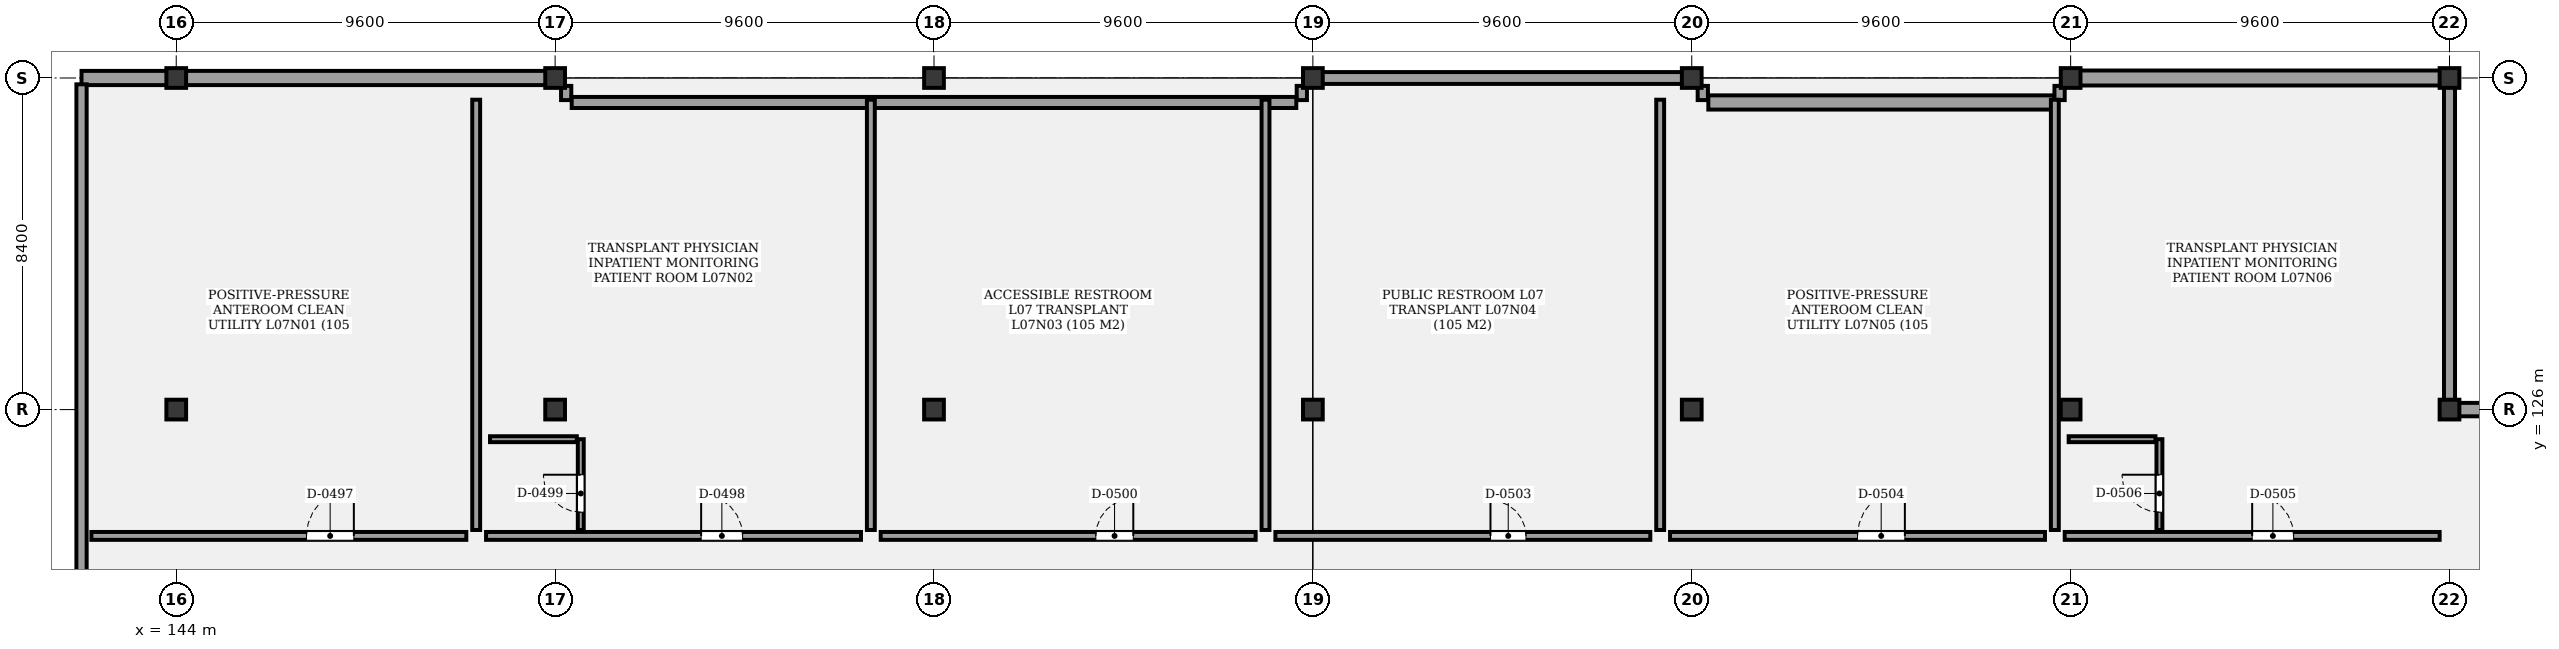
"""IFC4 building model, lengths in metres.
Left out: names, types, materials, properties, quantities, classifications, styles, units other than length and angle.
Written with IfcOpenShell. Run it as: python <this file> out.ifc"""

import sys

from ifc_helpers import new_model, si_unit, direction, frame, frame_2d, origin, origin_2d, place, context, subcontext, project, spatial, rectangle, extrude, element, fill, save


model = new_model("IFC4")
c1 = context("Model", 3, precision=1e-05, world=origin(), true_north=direction((0.0, 1.0)))
c2 = subcontext(c1, "Body", "Model", "MODEL_VIEW")
j1 = project(units=[si_unit("LENGTHUNIT", "METRE"), si_unit("PLANEANGLEUNIT", "RADIAN")], contexts=[c1])
p1 = place(None, origin())
s1 = spatial("IfcSite", under=j1, at=p1, CompositionType="ELEMENT")
p2 = place(p1, origin())
s2 = spatial("IfcBuilding", under=s1, at=p2, CompositionType="ELEMENT")
p3 = place(p2, frame((0.0, 0.0, 30.4)))
s3 = spatial("IfcBuildingStorey", under=s2, at=p3, CompositionType="ELEMENT", Elevation=30.4)
for number, where, z_axis, x_axis in (
    (1, (144.0, 126.0, 0.0), (0.0, 0.0, 1.0), (1.0, 0.0, 0.0)),
    (2, (144.0, 134.4, 0.0), (0.0, 0.0, 1.0), (1.0, 0.0, 0.0)),
    (3, (153.6, 126.0, 0.0), (0.0, 0.0, 1.0), (1.0, 0.0, 0.0)),
    (4, (153.6, 134.4, 0.0), (0.0, 0.0, 1.0), (1.0, 0.0, 0.0)),
    (5, (163.2, 126.0, 0.0), (0.0, 0.0, 1.0), (1.0, 0.0, 0.0)),
    (6, (163.2, 134.4, 0.0), (0.0, 0.0, 1.0), (1.0, 0.0, 0.0)),
    (7, (172.8, 126.0, 0.0), (0.0, 0.0, 1.0), (1.0, 0.0, 0.0)),
    (8, (172.8, 134.4, 0.0), (0.0, 0.0, 1.0), (1.0, 0.0, 0.0)),
    (9, (182.4, 126.0, 0.0), (0.0, 0.0, 1.0), (1.0, 0.0, 0.0)),
    (10, (182.4, 134.4, 0.0), (0.0, 0.0, 1.0), (1.0, 0.0, 0.0)),
    (11, (192.0, 126.0, 0.0), (0.0, 0.0, 1.0), (1.0, 0.0, 0.0)),
    (12, (192.0, 134.4, 0.0), (0.0, 0.0, 1.0), (1.0, 0.0, 0.0)),
    (13, (201.6, 126.0, 0.0), (0.0, 0.0, 1.0), (1.0, 0.0, 0.0)),
    (14, (201.6, 134.4, 0.0), (0.0, 0.0, 1.0), (1.0, 0.0, 0.0)),
):
    element("IfcColumn", number, at=place(p3, frame(where, z_axis=z_axis, x_axis=x_axis)), inside=s3, PredefinedType="COLUMN", context=c2, shape_type="SweptSolid", body=[
        extrude(rectangle(XDim=0.5, YDim=0.5, at=origin_2d()), origin(), (0.0, 0.0, 1.0), 4.2),
    ])
p4 = place(p3, frame((201.6, 126.0, 0.0), z_axis=(0.0, 0.0, 1.0), x_axis=(1.0, 0.0, 0.0)))
e15 = element("IfcWall", 15, at=p4, inside=s3, PredefinedType="SOLIDWALL", context=c2, shape_type="SweptSolid", body=[
    extrude(rectangle(XDim=9.6, YDim=0.34, at=frame_2d((4.8, 0.0))), origin(), (0.0, 0.0, 1.0), 2.58),
])
p5 = place(p3, frame((141.6, 134.4, 0.0), z_axis=(0.0, 0.0, 1.0), x_axis=(1.0, 0.0, 0.0)))
e16 = element("IfcWall", 16, at=p5, inside=s3, PredefinedType="SOLIDWALL", context=c2, shape_type="SweptSolid", body=[
    extrude(rectangle(XDim=12.0, YDim=0.36, at=frame_2d((6.0, 0.0))), origin(), (0.0, 0.0, 1.0), 2.58),
])
for number, where, z_axis, x_axis in (
    (17, (153.88, 134.2, 0.0), (0.0, 0.0, 1.0), (0.0, -1.0, 0.0)),
    (18, (172.52, 134.2, 0.0), (0.0, 0.0, 1.0), (0.0, -1.0, 0.0)),
):
    element("IfcWall", number, at=place(p3, frame(where, z_axis=z_axis, x_axis=x_axis)), inside=s3, PredefinedType="SOLIDWALL", context=c2, shape_type="SweptSolid", body=[
        extrude(rectangle(XDim=0.36, YDim=0.26, at=frame_2d((0.18, 0.0))), origin(), (0.0, 0.0, 1.0), 2.58),
    ])
p6 = place(p3, frame((154.02, 133.78, 0.0), z_axis=(0.0, 0.0, 1.0), x_axis=(1.0, 0.0, 0.0)))
e19 = element("IfcWall", 19, at=p6, inside=s3, PredefinedType="SOLIDWALL", context=c2, shape_type="SweptSolid", body=[
    extrude(rectangle(XDim=18.36, YDim=0.28, at=frame_2d((9.18, 0.0))), origin(), (0.0, 0.0, 1.0), 2.58),
])
p7 = place(p3, frame((172.8, 134.4, 0.0), z_axis=(0.0, 0.0, 1.0), x_axis=(1.0, 0.0, 0.0)))
e20 = element("IfcWall", 20, at=p7, inside=s3, PredefinedType="SOLIDWALL", context=c2, shape_type="SweptSolid", body=[
    extrude(rectangle(XDim=9.6, YDim=0.3, at=frame_2d((4.8, 0.0))), origin(), (0.0, 0.0, 1.0), 2.58),
])
for number, where, z_axis, x_axis in (
    (21, (182.68, 134.2, 0.0), (0.0, 0.0, 1.0), (0.0, -1.0, 0.0)),
    (22, (191.72, 134.2, 0.0), (0.0, 0.0, 1.0), (0.0, -1.0, 0.0)),
):
    element("IfcWall", number, at=place(p3, frame(where, z_axis=z_axis, x_axis=x_axis)), inside=s3, PredefinedType="SOLIDWALL", context=c2, shape_type="SweptSolid", body=[
        extrude(rectangle(XDim=0.36, YDim=0.26, at=frame_2d((0.18, 0.0))), origin(), (0.0, 0.0, 1.0), 2.58),
    ])
p8 = place(p3, frame((182.82, 133.78, 0.0), z_axis=(0.0, 0.0, 1.0), x_axis=(1.0, 0.0, 0.0)))
e23 = element("IfcWall", 23, at=p8, inside=s3, PredefinedType="SOLIDWALL", context=c2, shape_type="SweptSolid", body=[
    extrude(rectangle(XDim=8.76, YDim=0.36, at=frame_2d((4.38, 0.0))), origin(), (0.0, 0.0, 1.0), 2.58),
])
p9 = place(p3, frame((192.0, 134.4, 0.0), z_axis=(0.0, 0.0, 1.0), x_axis=(1.0, 0.0, 0.0)))
e24 = element("IfcWall", 24, at=p9, inside=s3, PredefinedType="SOLIDWALL", context=c2, shape_type="SweptSolid", body=[
    extrude(rectangle(XDim=9.6, YDim=0.38, at=frame_2d((4.8, 0.0))), origin(), (0.0, 0.0, 1.0), 2.58),
])
p10 = place(p3, frame((141.6, 108.16, 0.0), z_axis=(0.0, 0.0, 1.0), x_axis=(0.0, 1.0, 0.0)))
e25 = element("IfcWall", 25, at=p10, inside=s3, PredefinedType="SOLIDWALL", context=c2, shape_type="SweptSolid", body=[
    extrude(rectangle(XDim=26.08, YDim=0.26, at=frame_2d((13.04, 0.0))), origin(), (0.0, 0.0, 1.0), 2.58),
])
p11 = place(p3, frame((201.6, 134.24, 0.0), z_axis=(0.0, 0.0, 1.0), x_axis=(0.0, -1.0, 0.0)))
e26 = element("IfcWall", 26, at=p11, inside=s3, PredefinedType="SOLIDWALL", context=c2, shape_type="SweptSolid", body=[
    extrude(rectangle(XDim=8.08, YDim=0.28, at=frame_2d((4.04, 0.0))), origin(), (0.0, 0.0, 1.0), 2.58),
])
p12 = place(p3, frame((141.85, 122.8, 0.0), z_axis=(0.0, 0.0, 1.0), x_axis=(1.0, 0.0, 0.0)))
e27 = element("IfcWall", 27, at=p12, inside=s3, PredefinedType="PARTITIONING", context=c2, shape_type="SweptSolid", body=[
    extrude(rectangle(XDim=9.5, YDim=0.2, at=frame_2d((4.75, 0.0))), origin(), (0.0, 0.0, 1.0), 2.58),
])
p13 = place(p12, frame((5.45, 0.0, 0.0)))
e28 = element("IfcOpeningElement", 28, at=p13, cuts=e27, PredefinedType="OPENING", context=c2, shape_type="SweptSolid", body=[
    extrude(rectangle(XDim=1.2, YDim=2.4, at=frame_2d((0.6, 1.2))), frame((0.0, 0.11, 0.0), z_axis=(0.0, -1.0, 0.0), x_axis=(1.0, 0.0, 0.0)), (0.0, 0.0, 1.0), 0.22),
])
p14 = place(p3, frame((151.85, 122.8, 0.0), z_axis=(0.0, 0.0, 1.0), x_axis=(1.0, 0.0, 0.0)))
e29 = element("IfcWall", 29, at=p14, inside=s3, PredefinedType="PARTITIONING", context=c2, shape_type="SweptSolid", body=[
    extrude(rectangle(XDim=9.5, YDim=0.2, at=frame_2d((4.75, 0.0))), origin(), (0.0, 0.0, 1.0), 2.58),
])
p15 = place(p14, frame((5.45, 0.0, 0.0)))
e30 = element("IfcOpeningElement", 30, at=p15, cuts=e29, PredefinedType="OPENING", context=c2, shape_type="SweptSolid", body=[
    extrude(rectangle(XDim=1.05, YDim=2.2, at=frame_2d((0.525, 1.1))), frame((0.0, 0.11, 0.0), z_axis=(0.0, -1.0, 0.0), x_axis=(1.0, 0.0, 0.0)), (0.0, 0.0, 1.0), 0.22),
])
p16 = place(p3, frame((154.25, 122.95, 0.0), z_axis=(0.0, 0.0, 1.0), x_axis=(0.0, 1.0, 0.0)))
e31 = element("IfcWall", 31, at=p16, inside=s3, PredefinedType="PARTITIONING", context=c2, shape_type="SweptSolid", body=[
    extrude(rectangle(XDim=2.3, YDim=0.15, at=frame_2d((1.15, 0.0))), origin(), (0.0, 0.0, 1.0), 2.58),
])
p17 = place(p16, frame((0.45, 0.0, 0.0)))
e32 = element("IfcOpeningElement", 32, at=p17, cuts=e31, PredefinedType="OPENING", context=c2, shape_type="SweptSolid", body=[
    extrude(rectangle(XDim=0.95, YDim=2.1, at=frame_2d((0.475, 1.05))), frame((0.0, 0.085, 0.0), z_axis=(0.0, -1.0, 0.0), x_axis=(1.0, 0.0, 0.0)), (0.0, 0.0, 1.0), 0.17),
])
p18 = place(p3, frame((151.95, 125.25, 0.0), z_axis=(0.0, 0.0, 1.0), x_axis=(1.0, 0.0, 0.0)))
e33 = element("IfcWall", 33, at=p18, inside=s3, PredefinedType="PARTITIONING", context=c2, shape_type="SweptSolid", body=[
    extrude(rectangle(XDim=2.2, YDim=0.15, at=frame_2d((1.1, 0.0))), origin(), (0.0, 0.0, 1.0), 2.58),
])
p19 = place(p3, frame((151.6, 122.95, 0.0), z_axis=(0.0, 0.0, 1.0), x_axis=(0.0, 1.0, 0.0)))
e34 = element("IfcWall", 34, at=p19, inside=s3, PredefinedType="PARTITIONING", context=c2, shape_type="SweptSolid", body=[
    extrude(rectangle(XDim=10.9, YDim=0.2, at=frame_2d((5.45, 0.0))), origin(), (0.0, 0.0, 1.0), 2.58),
])
p20 = place(p3, frame((161.85, 122.8, 0.0), z_axis=(0.0, 0.0, 1.0), x_axis=(1.0, 0.0, 0.0)))
e35 = element("IfcWall", 35, at=p20, inside=s3, PredefinedType="PARTITIONING", context=c2, shape_type="SweptSolid", body=[
    extrude(rectangle(XDim=9.5, YDim=0.2, at=frame_2d((4.75, 0.0))), origin(), (0.0, 0.0, 1.0), 2.58),
])
p21 = place(p20, frame((5.45, 0.0, 0.0)))
e36 = element("IfcOpeningElement", 36, at=p21, cuts=e35, PredefinedType="OPENING", context=c2, shape_type="SweptSolid", body=[
    extrude(rectangle(XDim=0.95, YDim=2.1, at=frame_2d((0.475, 1.05))), frame((0.0, 0.11, 0.0), z_axis=(0.0, -1.0, 0.0), x_axis=(1.0, 0.0, 0.0)), (0.0, 0.0, 1.0), 0.22),
])
p22 = place(p3, frame((161.6, 122.95, 0.0), z_axis=(0.0, 0.0, 1.0), x_axis=(0.0, 1.0, 0.0)))
e37 = element("IfcWall", 37, at=p22, inside=s3, PredefinedType="PARTITIONING", context=c2, shape_type="SweptSolid", body=[
    extrude(rectangle(XDim=10.9, YDim=0.2, at=frame_2d((5.45, 0.0))), origin(), (0.0, 0.0, 1.0), 2.58),
])
p23 = place(p3, frame((171.85, 122.8, 0.0), z_axis=(0.0, 0.0, 1.0), x_axis=(1.0, 0.0, 0.0)))
e38 = element("IfcWall", 38, at=p23, inside=s3, PredefinedType="PARTITIONING", context=c2, shape_type="SweptSolid", body=[
    extrude(rectangle(XDim=9.5, YDim=0.2, at=frame_2d((4.75, 0.0))), origin(), (0.0, 0.0, 1.0), 2.58),
])
p24 = place(p23, frame((5.45, 0.0, 0.0)))
e39 = element("IfcOpeningElement", 39, at=p24, cuts=e38, PredefinedType="OPENING", context=c2, shape_type="SweptSolid", body=[
    extrude(rectangle(XDim=0.9, YDim=2.1, at=frame_2d((0.45, 1.05))), frame((0.0, 0.11, 0.0), z_axis=(0.0, -1.0, 0.0), x_axis=(1.0, 0.0, 0.0)), (0.0, 0.0, 1.0), 0.22),
])
p25 = place(p3, frame((171.6, 122.95, 0.0), z_axis=(0.0, 0.0, 1.0), x_axis=(0.0, 1.0, 0.0)))
e40 = element("IfcWall", 40, at=p25, inside=s3, PredefinedType="PARTITIONING", context=c2, shape_type="SweptSolid", body=[
    extrude(rectangle(XDim=10.9, YDim=0.2, at=frame_2d((5.45, 0.0))), origin(), (0.0, 0.0, 1.0), 2.58),
])
p26 = place(p3, frame((181.85, 122.8, 0.0), z_axis=(0.0, 0.0, 1.0), x_axis=(1.0, 0.0, 0.0)))
e41 = element("IfcWall", 41, at=p26, inside=s3, PredefinedType="PARTITIONING", context=c2, shape_type="SweptSolid", body=[
    extrude(rectangle(XDim=9.5, YDim=0.2, at=frame_2d((4.75, 0.0))), origin(), (0.0, 0.0, 1.0), 2.58),
])
p27 = place(p26, frame((4.75, 0.0, 0.0)))
e42 = element("IfcOpeningElement", 42, at=p27, cuts=e41, PredefinedType="OPENING", context=c2, shape_type="SweptSolid", body=[
    extrude(rectangle(XDim=1.2, YDim=2.4, at=frame_2d((0.6, 1.2))), frame((0.0, 0.11, 0.0), z_axis=(0.0, -1.0, 0.0), x_axis=(1.0, 0.0, 0.0)), (0.0, 0.0, 1.0), 0.22),
])
p28 = place(p3, frame((181.6, 122.95, 0.0), z_axis=(0.0, 0.0, 1.0), x_axis=(0.0, 1.0, 0.0)))
e43 = element("IfcWall", 43, at=p28, inside=s3, PredefinedType="PARTITIONING", context=c2, shape_type="SweptSolid", body=[
    extrude(rectangle(XDim=10.9, YDim=0.2, at=frame_2d((5.45, 0.0))), origin(), (0.0, 0.0, 1.0), 2.58),
])
p29 = place(p3, frame((191.85, 122.8, 0.0), z_axis=(0.0, 0.0, 1.0), x_axis=(1.0, 0.0, 0.0)))
e44 = element("IfcWall", 44, at=p29, inside=s3, PredefinedType="PARTITIONING", context=c2, shape_type="SweptSolid", body=[
    extrude(rectangle(XDim=9.5, YDim=0.2, at=frame_2d((4.75, 0.0))), origin(), (0.0, 0.0, 1.0), 2.58),
])
p30 = place(p29, frame((4.75, 0.0, 0.0)))
e45 = element("IfcOpeningElement", 45, at=p30, cuts=e44, PredefinedType="OPENING", context=c2, shape_type="SweptSolid", body=[
    extrude(rectangle(XDim=1.05, YDim=2.2, at=frame_2d((0.525, 1.1))), frame((0.0, 0.11, 0.0), z_axis=(0.0, -1.0, 0.0), x_axis=(1.0, 0.0, 0.0)), (0.0, 0.0, 1.0), 0.22),
])
p31 = place(p3, frame((194.25, 122.95, 0.0), z_axis=(0.0, 0.0, 1.0), x_axis=(0.0, 1.0, 0.0)))
e46 = element("IfcWall", 46, at=p31, inside=s3, PredefinedType="PARTITIONING", context=c2, shape_type="SweptSolid", body=[
    extrude(rectangle(XDim=2.3, YDim=0.15, at=frame_2d((1.15, 0.0))), origin(), (0.0, 0.0, 1.0), 2.58),
])
p32 = place(p31, frame((0.45, 0.0, 0.0)))
e47 = element("IfcOpeningElement", 47, at=p32, cuts=e46, PredefinedType="OPENING", context=c2, shape_type="SweptSolid", body=[
    extrude(rectangle(XDim=0.95, YDim=2.1, at=frame_2d((0.475, 1.05))), frame((0.0, 0.085, 0.0), z_axis=(0.0, -1.0, 0.0), x_axis=(1.0, 0.0, 0.0)), (0.0, 0.0, 1.0), 0.17),
])
p33 = place(p3, frame((191.95, 125.25, 0.0), z_axis=(0.0, 0.0, 1.0), x_axis=(1.0, 0.0, 0.0)))
e48 = element("IfcWall", 48, at=p33, inside=s3, PredefinedType="PARTITIONING", context=c2, shape_type="SweptSolid", body=[
    extrude(rectangle(XDim=2.2, YDim=0.15, at=frame_2d((1.1, 0.0))), origin(), (0.0, 0.0, 1.0), 2.58),
])
p34 = place(p3, frame((191.6, 122.95, 0.0), z_axis=(0.0, 0.0, 1.0), x_axis=(0.0, 1.0, 0.0)))
e49 = element("IfcWall", 49, at=p34, inside=s3, PredefinedType="PARTITIONING", context=c2, shape_type="SweptSolid", body=[
    extrude(rectangle(XDim=10.9, YDim=0.2, at=frame_2d((5.45, 0.0))), origin(), (0.0, 0.0, 1.0), 2.58),
])
p35 = place(p13, origin())
e50 = element("IfcDoor", 50, at=p35, inside=s3, OperationType="SINGLE_SWING_RIGHT", PredefinedType="DOOR", context=c2, shape_type="SweptSolid", body=[
    extrude(rectangle(XDim=1.2, YDim=2.4, at=frame_2d((0.6, 1.2))), frame((0.0, 0.025, 0.0), z_axis=(0.0, -1.0, 0.0), x_axis=(1.0, 0.0, 0.0)), (0.0, 0.0, 1.0), 0.05),
])
fill(e28, e50)
p36 = place(p15, origin())
e51 = element("IfcDoor", 51, at=p36, inside=s3, OperationType="SINGLE_SWING_LEFT", PredefinedType="DOOR", context=c2, shape_type="SweptSolid", body=[
    extrude(rectangle(XDim=1.05, YDim=2.2, at=frame_2d((0.525, 1.1))), frame((0.0, 0.025, 0.0), z_axis=(0.0, -1.0, 0.0), x_axis=(1.0, 0.0, 0.0)), (0.0, 0.0, 1.0), 0.05),
])
fill(e30, e51)
p37 = place(p17, origin())
e52 = element("IfcDoor", 52, at=p37, inside=s3, OperationType="SINGLE_SWING_RIGHT", PredefinedType="DOOR", context=c2, shape_type="SweptSolid", body=[
    extrude(rectangle(XDim=0.95, YDim=2.1, at=frame_2d((0.475, 1.05))), frame((0.0, 0.025, 0.0), z_axis=(0.0, -1.0, 0.0), x_axis=(1.0, 0.0, 0.0)), (0.0, 0.0, 1.0), 0.05),
])
fill(e32, e52)
p38 = place(p21, origin())
e53 = element("IfcDoor", 53, at=p38, inside=s3, OperationType="SINGLE_SWING_RIGHT", PredefinedType="DOOR", context=c2, shape_type="SweptSolid", body=[
    extrude(rectangle(XDim=0.95, YDim=2.1, at=frame_2d((0.475, 1.05))), frame((0.0, 0.025, 0.0), z_axis=(0.0, -1.0, 0.0), x_axis=(1.0, 0.0, 0.0)), (0.0, 0.0, 1.0), 0.05),
])
fill(e36, e53)
p39 = place(p24, origin())
e54 = element("IfcDoor", 54, at=p39, inside=s3, OperationType="SINGLE_SWING_LEFT", PredefinedType="DOOR", context=c2, shape_type="SweptSolid", body=[
    extrude(rectangle(XDim=0.9, YDim=2.1, at=frame_2d((0.45, 1.05))), frame((0.0, 0.025, 0.0), z_axis=(0.0, -1.0, 0.0), x_axis=(1.0, 0.0, 0.0)), (0.0, 0.0, 1.0), 0.05),
])
fill(e39, e54)
p40 = place(p27, origin())
e55 = element("IfcDoor", 55, at=p40, inside=s3, OperationType="SINGLE_SWING_RIGHT", PredefinedType="DOOR", context=c2, shape_type="SweptSolid", body=[
    extrude(rectangle(XDim=1.2, YDim=2.4, at=frame_2d((0.6, 1.2))), frame((0.0, 0.025, 0.0), z_axis=(0.0, -1.0, 0.0), x_axis=(1.0, 0.0, 0.0)), (0.0, 0.0, 1.0), 0.05),
])
fill(e42, e55)
p41 = place(p30, origin())
e56 = element("IfcDoor", 56, at=p41, inside=s3, OperationType="SINGLE_SWING_LEFT", PredefinedType="DOOR", context=c2, shape_type="SweptSolid", body=[
    extrude(rectangle(XDim=1.05, YDim=2.2, at=frame_2d((0.525, 1.1))), frame((0.0, 0.025, 0.0), z_axis=(0.0, -1.0, 0.0), x_axis=(1.0, 0.0, 0.0)), (0.0, 0.0, 1.0), 0.05),
])
fill(e45, e56)
p42 = place(p32, origin())
e57 = element("IfcDoor", 57, at=p42, inside=s3, OperationType="SINGLE_SWING_RIGHT", PredefinedType="DOOR", context=c2, shape_type="SweptSolid", body=[
    extrude(rectangle(XDim=0.95, YDim=2.1, at=frame_2d((0.475, 1.05))), frame((0.0, 0.025, 0.0), z_axis=(0.0, -1.0, 0.0), x_axis=(1.0, 0.0, 0.0)), (0.0, 0.0, 1.0), 0.05),
])
fill(e47, e57)
save(model, sys.argv[1])
